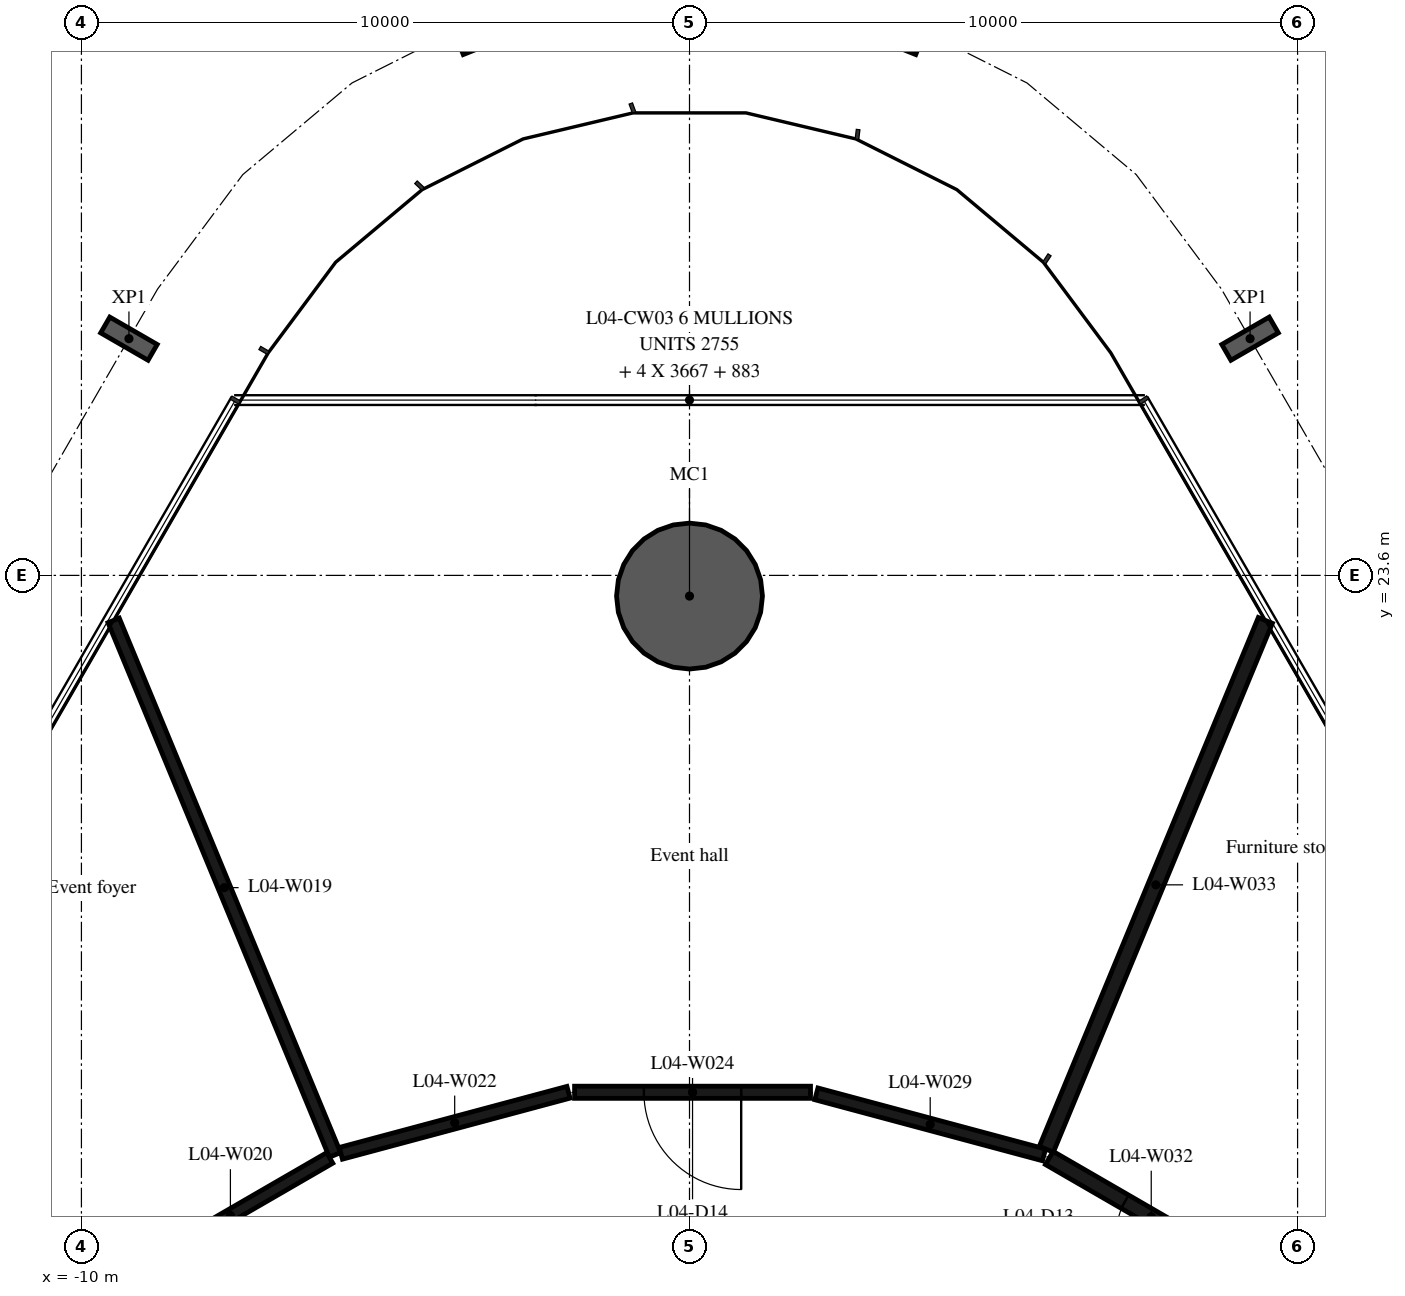
"""IFC4 building model, lengths in metres.
Left out: names, types, materials, properties, quantities, classifications, styles, units other than length and angle.
Written with IfcOpenShell. Run it as: python <this file> out.ifc"""

import sys

from ifc_helpers import new_model, si_unit, direction, frame, frame_2d, origin, origin_2d, place, context, subcontext, project, spatial, rectangle, hollow_circle, i_section, extrude, element, fill, save


model = new_model("IFC4")
c1 = context("Model", 3, precision=1e-05, world=origin(), true_north=direction((0.0, 1.0)))
c2 = subcontext(c1, "Body", "Model", "MODEL_VIEW")
j1 = project(units=[si_unit("LENGTHUNIT", "METRE"), si_unit("PLANEANGLEUNIT", "RADIAN")], contexts=[c1])
p1 = place(None, origin())
s1 = spatial("IfcSite", under=j1, at=p1, CompositionType="ELEMENT")
p2 = place(p1, origin())
s2 = spatial("IfcBuilding", under=s1, at=p2, CompositionType="ELEMENT")
p3 = place(p2, frame((0.0, 0.0, 23.4)))
s3 = spatial("IfcBuildingStorey", under=s2, at=p3, CompositionType="ELEMENT", Elevation=23.4)
p4 = place(p3, frame((0.0, 23.26, -0.38), z_axis=(0.0, 0.0, 1.0), x_axis=(1.0, 0.0, 0.0)))
e1 = element("IfcColumn", 1, at=p4, inside=s3, PredefinedType="COLUMN", context=c2, shape_type="SweptSolid", body=[
    extrude(hollow_circle(Radius=1.2, WallThickness=0.06, at=origin_2d()), origin(), (0.0, 0.0, 1.0), 4.8),
])
for number, where, z_axis, x_axis in (
    (2, (9.219, 27.493, -0.38), (0.0, 0.0, 1.0), (0.5, -0.866, 0.0)),
    (3, (3.748, 32.639, -0.38), (0.0, 0.0, 1.0), (0.929, -0.371, 0.0)),
    (4, (-3.748, 32.639, -0.38), (0.0, 0.0, 1.0), (0.929, 0.371, 0.0)),
    (5, (-9.219, 27.493, -0.38), (0.0, 0.0, 1.0), (0.5, 0.866, 0.0)),
):
    element("IfcColumn", number, at=place(p3, frame(where, z_axis=z_axis, x_axis=x_axis)), inside=s3, PredefinedType="COLUMN", context=c2, shape_type="SweptSolid", body=[
        extrude(i_section(OverallWidth=0.3, OverallDepth=0.9, WebThickness=0.019, FlangeThickness=0.035, FilletRadius=0.03, at=origin_2d()), origin(), (0.0, 0.0, 1.0), 4.8),
    ])
p5 = place(p3, frame((-5.83, 14.07, 0.0), z_axis=(0.0, 0.0, 1.0), x_axis=(-0.382588257379, 0.923918949538, 0.0)))
e6 = element("IfcWall", 6, at=p5, inside=s3, PredefinedType="PARTITIONING", context=c2, shape_type="SweptSolid", body=[
    extrude(rectangle(XDim=9.514, YDim=0.2, at=frame_2d((4.757, 0.0))), origin(), (0.0, 0.0, 1.0), 4.42),
])
p6 = place(p3, frame((-5.917, 14.02, 0.0), z_axis=(0.0, 0.0, 1.0), x_axis=(-0.865591582237, -0.500750649286, 0.0)))
e7 = element("IfcWall", 7, at=p6, inside=s3, PredefinedType="PARTITIONING", context=c2, shape_type="SweptSolid", body=[
    extrude(rectangle(XDim=3.774, YDim=0.2, at=frame_2d((1.887, 0.0))), origin(), (0.0, 0.0, 1.0), 4.42),
])
p7 = place(p3, frame((-1.99, 15.1, 0.0), z_axis=(0.0, 0.0, 1.0), x_axis=(-0.96585437197, -0.259085569159, 0.0)))
e8 = element("IfcWall", 8, at=p7, inside=s3, PredefinedType="PARTITIONING", context=c2, shape_type="SweptSolid", body=[
    extrude(rectangle(XDim=3.876, YDim=0.2, at=frame_2d((1.938, 0.0))), origin(), (0.0, 0.0, 1.0), 4.42),
])
p8 = place(p3, frame((1.99, 15.1, 0.0), z_axis=(0.0, 0.0, 1.0), x_axis=(-1.0, 0.0, 0.0)))
e9 = element("IfcWall", 9, at=p8, inside=s3, PredefinedType="PARTITIONING", context=c2, shape_type="SweptSolid", body=[
    extrude(rectangle(XDim=3.88, YDim=0.2, at=frame_2d((1.94, 0.0))), origin(), (0.0, 0.0, 1.0), 4.42),
])
p9 = place(p8, frame((1.14, 0.0, 0.0)))
e10 = element("IfcOpeningElement", 10, at=p9, cuts=e9, PredefinedType="OPENING", context=c2, shape_type="SweptSolid", body=[
    extrude(rectangle(XDim=1.6, YDim=2.1, at=frame_2d((0.8, 1.05))), frame((0.0, 0.11, 0.0), z_axis=(0.0, -1.0, 0.0), x_axis=(1.0, 0.0, 0.0)), (0.0, 0.0, 1.0), 0.22),
])
p10 = place(p3, frame((5.83, 14.07, 0.0), z_axis=(0.0, 0.0, 1.0), x_axis=(-0.965870133458, 0.259026804199, 0.0)))
e11 = element("IfcWall", 11, at=p10, inside=s3, PredefinedType="PARTITIONING", context=c2, shape_type="SweptSolid", body=[
    extrude(rectangle(XDim=3.876, YDim=0.2, at=frame_2d((1.938, 0.0))), origin(), (0.0, 0.0, 1.0), 4.42),
])
p11 = place(p3, frame((9.27, 12.08, 0.0), z_axis=(0.0, 0.0, 1.0), x_axis=(-0.865601686425, 0.500733182901, 0.0)))
e12 = element("IfcWall", 12, at=p11, inside=s3, PredefinedType="PARTITIONING", context=c2, shape_type="SweptSolid", body=[
    extrude(rectangle(XDim=3.874, YDim=0.25, at=frame_2d((1.937, 0.0))), origin(), (0.0, 0.0, 1.0), 4.42),
])
p12 = place(p11, frame((1.437, 0.0, 0.0)))
e13 = element("IfcOpeningElement", 13, at=p12, cuts=e12, PredefinedType="OPENING", context=c2, shape_type="SweptSolid", body=[
    extrude(rectangle(XDim=1.0, YDim=2.1, at=frame_2d((0.5, 1.05))), frame((0.0, 0.135, 0.0), z_axis=(0.0, -1.0, 0.0), x_axis=(1.0, 0.0, 0.0)), (0.0, 0.0, 1.0), 0.27),
])
p13 = place(p3, frame((9.47, 22.86, 0.0), z_axis=(0.0, 0.0, 1.0), x_axis=(-0.382599926304, -0.923914117433, 0.0)))
e14 = element("IfcWall", 14, at=p13, inside=s3, PredefinedType="PARTITIONING", context=c2, shape_type="SweptSolid", body=[
    extrude(rectangle(XDim=9.414, YDim=0.25, at=frame_2d((4.707, 0.0))), origin(), (0.0, 0.0, 1.0), 4.42),
])
p14 = place(p12, origin())
e15 = element("IfcDoor", 15, at=p14, inside=s3, OperationType="SINGLE_SWING_LEFT", PredefinedType="DOOR", context=c2, shape_type="SweptSolid", body=[
    extrude(rectangle(XDim=1.0, YDim=2.1, at=frame_2d((0.5, 1.05))), frame((0.0, 0.025, 0.0), z_axis=(0.0, -1.0, 0.0), x_axis=(1.0, 0.0, 0.0)), (0.0, 0.0, 1.0), 0.05),
])
fill(e13, e15)
p15 = place(p9, origin())
e16 = element("IfcDoor", 16, at=p15, inside=s3, OperationType="DOUBLE_DOOR_SINGLE_SWING", PredefinedType="DOOR", context=c2, shape_type="SweptSolid", body=[
    extrude(rectangle(XDim=1.6, YDim=2.1, at=frame_2d((0.8, 1.05))), frame((0.0, 0.025, 0.0), z_axis=(0.0, -1.0, 0.0), x_axis=(1.0, 0.0, 0.0)), (0.0, 0.0, 1.0), 0.05),
])
fill(e10, e16)
save(model, sys.argv[1])
